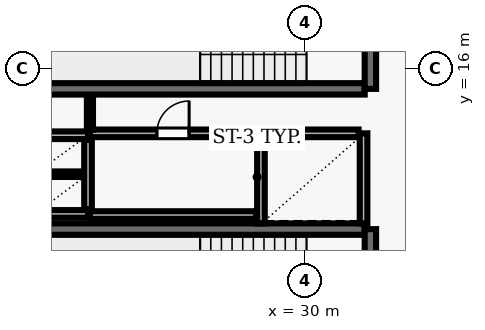
"""IFC4 building model, lengths in metres.
Left out: names, types, materials, properties, quantities, classifications, styles, units other than length and angle.
Written with IfcOpenShell. Run it as: python <this file> out.ifc"""

import sys

from ifc_helpers import new_model, si_unit, direction, frame, frame_2d, origin, place, context, subcontext, project, spatial, rectangle, extrude, element, fill, save


model = new_model("IFC4")
c1 = context("Model", 3, precision=1e-05, world=origin(), true_north=direction((0.0, 1.0)))
c2 = subcontext(c1, "Body", "Model", "MODEL_VIEW")
j1 = project(units=[si_unit("LENGTHUNIT", "METRE"), si_unit("PLANEANGLEUNIT", "RADIAN")], contexts=[c1])
p1 = place(None, origin())
s1 = spatial("IfcSite", under=j1, at=p1, CompositionType="ELEMENT")
p2 = place(p1, origin())
s2 = spatial("IfcBuilding", under=s1, at=p2, CompositionType="ELEMENT")
p3 = place(p2, frame((0.0, 0.0, 66.1)))
s3 = spatial("IfcBuildingStorey", under=s2, at=p3, CompositionType="ELEMENT", Elevation=66.1)
p4 = place(p3, frame((23.22, 15.47, 0.0), z_axis=(0.0, 0.0, 1.0), x_axis=(1.0, 0.0, 0.0)))
e1 = element("IfcWall", 1, at=p4, inside=s3, PredefinedType="SHEAR", context=c2, shape_type="SweptSolid", body=[
    extrude(rectangle(XDim=8.36, YDim=0.3, at=frame_2d((4.18, 0.0))), origin(), (0.0, 0.0, 1.0), 3.69),
])
p5 = place(p3, frame((31.73, 15.47, 0.0), z_axis=(0.0, 0.0, 1.0), x_axis=(0.0, 1.0, 0.0)))
e2 = element("IfcWall", 2, at=p5, inside=s3, PredefinedType="SHEAR", context=c2, shape_type="SweptSolid", body=[
    extrude(rectangle(XDim=3.51, YDim=0.3, at=frame_2d((1.755, 0.0))), origin(), (0.0, 0.0, 1.0), 3.69),
])
p6 = place(p5, frame((1.18, 0.0, 0.0)))
e3 = element("IfcOpeningElement", 3, at=p6, cuts=e2, PredefinedType="OPENING", context=c2, shape_type="SweptSolid", body=[
    extrude(rectangle(XDim=1.15, YDim=2.15, at=frame_2d((0.575, 1.075))), frame((0.0, 0.16, 0.0), z_axis=(0.0, -1.0, 0.0), x_axis=(1.0, 0.0, 0.0)), (0.0, 0.0, 1.0), 0.32),
])
p7 = place(p3, frame((31.58, 11.78, 0.0), z_axis=(0.0, 0.0, 1.0), x_axis=(-1.0, 0.0, 0.0)))
e4 = element("IfcWall", 4, at=p7, inside=s3, PredefinedType="SHEAR", context=c2, shape_type="SweptSolid", body=[
    extrude(rectangle(XDim=8.36, YDim=0.3, at=frame_2d((4.18, 0.0))), origin(), (0.0, 0.0, 1.0), 3.69),
])
p8 = place(p3, frame((31.73, 8.27, 0.0), z_axis=(0.0, 0.0, 1.0), x_axis=(0.0, 1.0, 0.0)))
e5 = element("IfcWall", 5, at=p8, inside=s3, PredefinedType="SHEAR", context=c2, shape_type="SweptSolid", body=[
    extrude(rectangle(XDim=3.51, YDim=0.3, at=frame_2d((1.755, 0.0))), origin(), (0.0, 0.0, 1.0), 3.69),
])
p9 = place(p8, frame((1.18, 0.0, 0.0)))
e6 = element("IfcOpeningElement", 6, at=p9, cuts=e5, PredefinedType="OPENING", context=c2, shape_type="SweptSolid", body=[
    extrude(rectangle(XDim=1.15, YDim=2.15, at=frame_2d((0.575, 1.075))), frame((0.0, 0.16, 0.0), z_axis=(0.0, -1.0, 0.0), x_axis=(1.0, 0.0, 0.0)), (0.0, 0.0, 1.0), 0.32),
])
for number, where, z_axis, x_axis in (
    (7, (28.85, 14.3, 0.0), (0.0, 0.0, 1.0), (0.0, -1.0, 0.0)),
    (8, (31.55, 11.93, 0.0), (0.0, 0.0, 1.0), (0.0, 1.0, 0.0)),
):
    element("IfcWall", number, at=place(p3, frame(where, z_axis=z_axis, x_axis=x_axis)), inside=s3, PredefinedType="SOLIDWALL", context=c2, shape_type="SweptSolid", body=[
        extrude(rectangle(XDim=2.37, YDim=0.2, at=frame_2d((1.185, 0.0))), origin(), (0.0, 0.0, 1.0), 3.69),
    ])
p10 = place(p3, frame((31.42, 14.3, 0.0), z_axis=(0.0, 0.0, 1.0), x_axis=(-1.0, 0.0, 0.0)))
e9 = element("IfcWall", 9, at=p10, inside=s3, PredefinedType="SOLIDWALL", context=c2, shape_type="SweptSolid", body=[
    extrude(rectangle(XDim=2.44, YDim=0.2, at=frame_2d((1.22, 0.0))), origin(), (0.0, 0.0, 1.0), 3.69),
])
for number, where, z_axis, x_axis in (
    (10, (22.9, 14.25, 0.0), (0.0, 0.0, 1.0), (1.0, 0.0, 0.0)),
    (11, (22.9, 12.18, 0.0), (0.0, 0.0, 1.0), (1.0, 0.0, 0.0)),
):
    element("IfcWall", number, at=place(p3, frame(where, z_axis=z_axis, x_axis=x_axis)), inside=s3, PredefinedType="SOLIDWALL", context=c2, shape_type="SweptSolid", body=[
        extrude(rectangle(XDim=1.4, YDim=0.2, at=frame_2d((0.7, 0.0))), origin(), (0.0, 0.0, 1.0), 3.69),
    ])
p11 = place(p3, frame((24.3, 12.3, 0.0), z_axis=(0.0, 0.0, 1.0), x_axis=(0.0, 1.0, 0.0)))
e12 = element("IfcWall", 12, at=p11, inside=s3, PredefinedType="SOLIDWALL", context=c2, shape_type="SweptSolid", body=[
    extrude(rectangle(XDim=1.83, YDim=0.2, at=frame_2d((0.915, 0.0))), origin(), (0.0, 0.0, 1.0), 3.69),
])
p12 = place(p3, frame((23.01, 13.225, 0.0), z_axis=(0.0, 0.0, 1.0), x_axis=(1.0, 0.0, 0.0)))
e13 = element("IfcWall", 13, at=p12, inside=s3, PredefinedType="PARTITIONING", context=c2, shape_type="SweptSolid", body=[
    extrude(rectangle(XDim=1.18, YDim=0.145, at=frame_2d((0.59, 0.0))), origin(), (0.0, 0.0, 1.0), 3.69),
])
p13 = place(p3, frame((24.35, 12.15, 0.0), z_axis=(0.0, 0.0, 1.0), x_axis=(1.0, 0.0, 0.0)))
e14 = element("IfcWall", 14, at=p13, inside=s3, PredefinedType="SOLIDWALL", context=c2, shape_type="SweptSolid", body=[
    extrude(rectangle(XDim=4.37, YDim=0.2, at=frame_2d((2.185, 0.0))), origin(), (0.0, 0.0, 1.0), 3.69),
])
p14 = place(p3, frame((24.35, 14.3, 0.0), z_axis=(0.0, 0.0, 1.0), x_axis=(1.0, 0.0, 0.0)))
e15 = element("IfcWall", 15, at=p14, inside=s3, PredefinedType="SOLIDWALL", context=c2, shape_type="SweptSolid", body=[
    extrude(rectangle(XDim=4.37, YDim=0.2, at=frame_2d((2.185, 0.0))), origin(), (0.0, 0.0, 1.0), 3.69),
])
p15 = place(p14, frame((1.76, 0.0, 0.0)))
e16 = element("IfcOpeningElement", 16, at=p15, cuts=e15, PredefinedType="OPENING", context=c2, shape_type="SweptSolid", body=[
    extrude(rectangle(XDim=0.85, YDim=2.1, at=frame_2d((0.425, 1.05))), frame((0.0, 0.11, 0.0), z_axis=(0.0, -1.0, 0.0), x_axis=(1.0, 0.0, 0.0)), (0.0, 0.0, 1.0), 0.22),
])
p16 = place(p3, frame((24.35, 15.29, 0.0), z_axis=(0.0, 0.0, 1.0), x_axis=(0.0, -1.0, 0.0)))
e17 = element("IfcWall", 17, at=p16, inside=s3, PredefinedType="PARTITIONING", context=c2, shape_type="SweptSolid", body=[
    extrude(rectangle(XDim=0.895, YDim=0.16, at=frame_2d((0.448, 0.0))), origin(), (0.0, 0.0, 1.0), 3.69),
])
p17 = place(p15, origin())
e18 = element("IfcDoor", 18, at=p17, inside=s3, OperationType="SINGLE_SWING_RIGHT", PredefinedType="DOOR", context=c2, shape_type="SweptSolid", body=[
    extrude(rectangle(XDim=0.85, YDim=2.1, at=frame_2d((0.425, 1.05))), frame((0.0, 0.025, 0.0), z_axis=(0.0, -1.0, 0.0), x_axis=(1.0, 0.0, 0.0)), (0.0, 0.0, 1.0), 0.05),
])
fill(e16, e18)
save(model, sys.argv[1])
